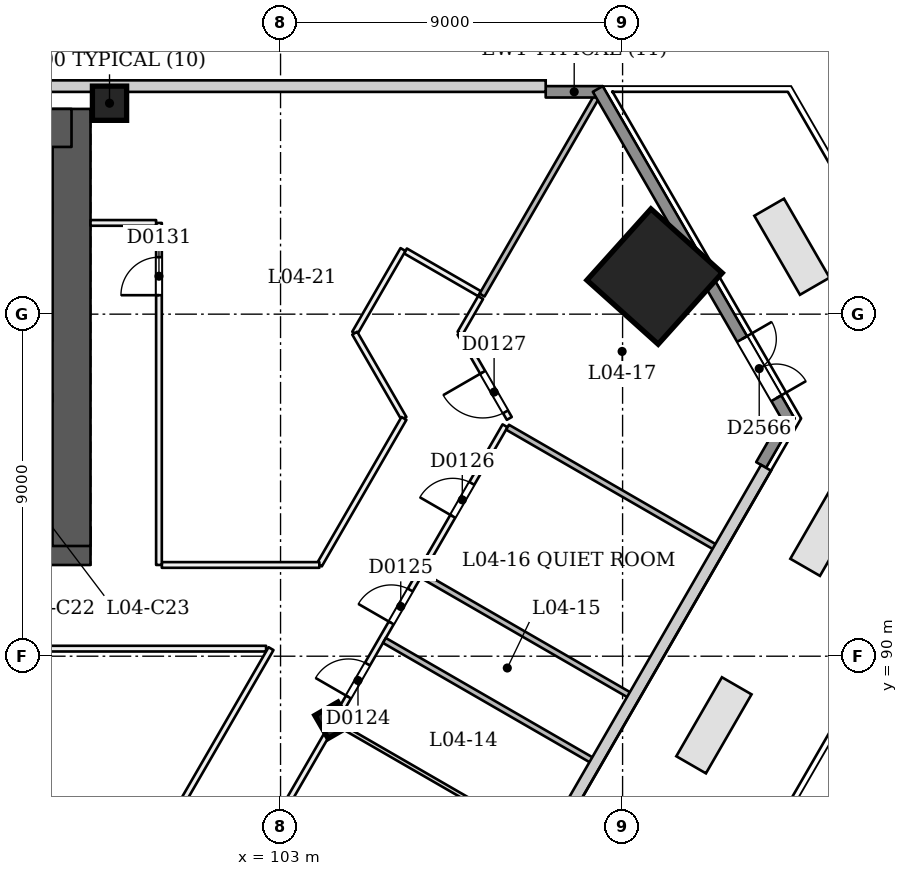
"""IFC4 building model, lengths in metres.
Left out: names, types, materials, properties, quantities, classifications, styles, units other than length and angle.
Written with IfcOpenShell. Run it as: python <this file> out.ifc"""

import sys

from ifc_helpers import new_model, si_unit, direction, frame, frame_2d, origin, origin_2d, place, context, subcontext, project, spatial, rectangle, extrude, element, fill, save


model = new_model("IFC4")
c1 = context("Model", 3, precision=1e-05, world=origin(), true_north=direction((0.0, 1.0)))
c2 = subcontext(c1, "Body", "Model", "MODEL_VIEW")
j1 = project(units=[si_unit("LENGTHUNIT", "METRE"), si_unit("PLANEANGLEUNIT", "RADIAN")], contexts=[c1])
p1 = place(None, origin())
s1 = spatial("IfcSite", under=j1, at=p1, CompositionType="ELEMENT")
p2 = place(p1, origin())
s2 = spatial("IfcBuilding", under=s1, at=p2, CompositionType="ELEMENT")
p3 = place(p2, frame((0.0, 0.0, 22.5)))
s3 = spatial("IfcBuildingStorey", under=s2, at=p3, CompositionType="ELEMENT", Elevation=22.5)
p4 = place(p3, frame((72.5, 92.9, 0.0), z_axis=(0.0, 0.0, 1.0), x_axis=(1.0, 0.0, 0.0)))
e1 = element("IfcWall", 1, at=p4, inside=s3, PredefinedType="SHEAR", context=c2, shape_type="SweptSolid", body=[
    extrude(rectangle(XDim=25.5, YDim=1.0, at=frame_2d((12.75, 0.0))), origin(), (0.0, 0.0, 1.0), 4.5),
])
p5 = place(p4, frame((1.3, 0.0, 0.0)))
e2 = element("IfcOpeningElement", 2, at=p5, cuts=e1, PredefinedType="OPENING", context=c2, shape_type="SweptSolid", body=[
    extrude(rectangle(XDim=1.2, YDim=2.1, at=frame_2d((0.6, 1.05))), frame((0.0, 0.51, 0.0), z_axis=(0.0, -1.0, 0.0), x_axis=(1.0, 0.0, 0.0)), (0.0, 0.0, 1.0), 1.021),
])
p6 = place(p4, frame((3.5, 0.0, 0.0)))
e3 = element("IfcOpeningElement", 3, at=p6, cuts=e1, PredefinedType="OPENING", context=c2, shape_type="SweptSolid", body=[
    extrude(rectangle(XDim=1.2, YDim=2.1, at=frame_2d((0.6, 1.05))), frame((0.0, 0.51, 0.0), z_axis=(0.0, -1.0, 0.0), x_axis=(1.0, 0.0, 0.0)), (0.0, 0.0, 1.0), 1.021),
])
p7 = place(p4, frame((13.5, 0.0, 0.0)))
e4 = element("IfcOpeningElement", 4, at=p7, cuts=e1, PredefinedType="OPENING", context=c2, shape_type="SweptSolid", body=[
    extrude(rectangle(XDim=1.2, YDim=2.1, at=frame_2d((0.6, 1.05))), frame((0.0, 0.51, 0.0), z_axis=(0.0, -1.0, 0.0), x_axis=(1.0, 0.0, 0.0)), (0.0, 0.0, 1.0), 1.021),
])
p8 = place(p4, frame((15.562, 0.0, 0.0)))
e5 = element("IfcOpeningElement", 5, at=p8, cuts=e1, PredefinedType="OPENING", context=c2, shape_type="SweptSolid", body=[
    extrude(rectangle(XDim=1.0, YDim=2.1, at=frame_2d((0.5, 1.05))), frame((0.0, 0.51, 0.0), z_axis=(0.0, -1.0, 0.0), x_axis=(1.0, 0.0, 0.0)), (0.0, 0.0, 1.0), 1.021),
])
p9 = place(p4, frame((17.8, 0.0, 0.0)))
e6 = element("IfcOpeningElement", 6, at=p9, cuts=e1, PredefinedType="OPENING", context=c2, shape_type="SweptSolid", body=[
    extrude(rectangle(XDim=1.0, YDim=2.1, at=frame_2d((0.5, 1.05))), frame((0.0, 0.51, 0.0), z_axis=(0.0, -1.0, 0.0), x_axis=(1.0, 0.0, 0.0)), (0.0, 0.0, 1.0), 1.021),
])
p10 = place(p4, frame((20.35, 0.0, 0.0)))
e7 = element("IfcOpeningElement", 7, at=p10, cuts=e1, PredefinedType="OPENING", context=c2, shape_type="SweptSolid", body=[
    extrude(rectangle(XDim=1.0, YDim=2.1, at=frame_2d((0.5, 1.05))), frame((0.0, 0.51, 0.0), z_axis=(0.0, -1.0, 0.0), x_axis=(1.0, 0.0, 0.0)), (0.0, 0.0, 1.0), 1.021),
])
p11 = place(p4, frame((22.837, 0.0, 0.0)))
e8 = element("IfcOpeningElement", 8, at=p11, cuts=e1, PredefinedType="OPENING", context=c2, shape_type="SweptSolid", body=[
    extrude(rectangle(XDim=1.0, YDim=2.1, at=frame_2d((0.5, 1.05))), frame((0.0, 0.51, 0.0), z_axis=(0.0, -1.0, 0.0), x_axis=(1.0, 0.0, 0.0)), (0.0, 0.0, 1.0), 1.021),
])
p12 = place(p3, frame((97.5, 92.9, 0.0), z_axis=(0.0, 0.0, 1.0), x_axis=(0.0, 1.0, 0.0)))
e9 = element("IfcWall", 9, at=p12, inside=s3, PredefinedType="SHEAR", context=c2, shape_type="SweptSolid", body=[
    extrude(rectangle(XDim=11.5, YDim=1.0, at=frame_2d((5.75, 0.0))), origin(), (0.0, 0.0, 1.0), 4.5),
])
p13 = place(p3, frame((97.5, 103.9, 0.0), z_axis=(0.0, 0.0, 1.0), x_axis=(-1.0, 0.0, 0.0)))
e10 = element("IfcWall", 10, at=p13, inside=s3, PredefinedType="SHEAR", context=c2, shape_type="SweptSolid", body=[
    extrude(rectangle(XDim=25.5, YDim=1.0, at=frame_2d((12.75, 0.0))), origin(), (0.0, 0.0, 1.0), 4.5),
])
p14 = place(p3, frame((104.408, 88.267, -0.021), z_axis=(-0.022167823514, 0.038427840761, 0.999015459668), x_axis=(-0.500557796662, -0.865418894264, 0.022181741384)))
e11 = element("IfcColumn", 11, at=p14, inside=s3, PredefinedType="COLUMN", context=c2, shape_type="SweptSolid", body=[
    extrude(rectangle(XDim=0.7, YDim=0.7, at=origin_2d()), origin(), (0.0, 0.0, 1.0), 4.504),
])
p15 = place(p3, frame((112.875, 99.978, 0.0), z_axis=(-0.028361945142, 0.009218987905, 0.999555206244), x_axis=(0.500391934376, -0.865514823496, 0.022181125308)))
e12 = element("IfcColumn", 12, at=p15, inside=s3, PredefinedType="COLUMN", context=c2, shape_type="SweptSolid", body=[
    extrude(rectangle(XDim=2.52, YDim=2.52, at=origin_2d()), origin(), (0.0, 0.0, 1.0), 4.502),
])
p16 = place(p3, frame((98.5, 104.55, 0.0), z_axis=(0.0, 0.0, 1.0), x_axis=(1.0, 0.0, 0.0)))
e13 = element("IfcColumn", 13, at=p16, inside=s3, PredefinedType="COLUMN", context=c2, shape_type="SweptSolid", body=[
    extrude(rectangle(XDim=0.9, YDim=0.9, at=origin_2d()), origin(), (0.0, 0.0, 1.0), 4.5),
])
p17 = place(p3, frame((86.407, 57.091, 0.0), z_axis=(0.0, 0.0, 1.0), x_axis=(0.49999953585, 0.866025671762, 0.0)))
e14 = element("IfcWall", 14, at=p17, inside=s3, PredefinedType="PARTITIONING", context=c2, shape_type="SweptSolid", body=[
    extrude(rectangle(XDim=45.0, YDim=0.15, at=frame_2d((22.5, 0.0))), origin(), (0.0, 0.0, 1.0), 3.6),
])
p18 = place(p17, frame((6.15, 0.0, 0.0)))
e15 = element("IfcOpeningElement", 15, at=p18, cuts=e14, PredefinedType="OPENING", context=c2, shape_type="SweptSolid", body=[
    extrude(rectangle(XDim=1.2, YDim=2.1, at=frame_2d((0.6, 1.05))), frame((0.0, 0.085, 0.0), z_axis=(0.0, -1.0, 0.0), x_axis=(1.0, 0.0, 0.0)), (0.0, 0.0, 1.0), 0.171),
])
p19 = place(p17, frame((16.3, 0.0, 0.0)))
e16 = element("IfcOpeningElement", 16, at=p19, cuts=e14, PredefinedType="OPENING", context=c2, shape_type="SweptSolid", body=[
    extrude(rectangle(XDim=1.2, YDim=2.1, at=frame_2d((0.6, 1.05))), frame((0.0, 0.085, 0.0), z_axis=(0.0, -1.0, 0.0), x_axis=(1.0, 0.0, 0.0)), (0.0, 0.0, 1.0), 0.171),
])
p20 = place(p17, frame((24.25, 0.0, 0.0)))
e17 = element("IfcOpeningElement", 17, at=p20, cuts=e14, PredefinedType="OPENING", context=c2, shape_type="SweptSolid", body=[
    extrude(rectangle(XDim=1.0, YDim=2.1, at=frame_2d((0.5, 1.05))), frame((0.0, 0.085, 0.0), z_axis=(0.0, -1.0, 0.0), x_axis=(1.0, 0.0, 0.0)), (0.0, 0.0, 1.0), 0.171),
])
p21 = place(p17, frame((30.9, 0.0, 0.0)))
e18 = element("IfcOpeningElement", 18, at=p21, cuts=e14, PredefinedType="OPENING", context=c2, shape_type="SweptSolid", body=[
    extrude(rectangle(XDim=1.2, YDim=2.1, at=frame_2d((0.6, 1.05))), frame((0.0, 0.085, 0.0), z_axis=(0.0, -1.0, 0.0), x_axis=(1.0, 0.0, 0.0)), (0.0, 0.0, 1.0), 0.171),
])
p22 = place(p17, frame((36.761, 0.0, 0.0)))
e19 = element("IfcOpeningElement", 19, at=p22, cuts=e14, PredefinedType="OPENING", context=c2, shape_type="SweptSolid", body=[
    extrude(rectangle(XDim=1.0, YDim=2.1, at=frame_2d((0.5, 1.05))), frame((0.0, 0.085, 0.0), z_axis=(0.0, -1.0, 0.0), x_axis=(1.0, 0.0, 0.0)), (0.0, 0.0, 1.0), 0.171),
])
p23 = place(p17, frame((39.011, 0.0, 0.0)))
e20 = element("IfcOpeningElement", 20, at=p23, cuts=e14, PredefinedType="OPENING", context=c2, shape_type="SweptSolid", body=[
    extrude(rectangle(XDim=1.0, YDim=2.1, at=frame_2d((0.5, 1.05))), frame((0.0, 0.085, 0.0), z_axis=(0.0, -1.0, 0.0), x_axis=(1.0, 0.0, 0.0)), (0.0, 0.0, 1.0), 0.171),
])
p24 = place(p17, frame((42.25, 0.0, 0.0)))
e21 = element("IfcOpeningElement", 21, at=p24, cuts=e14, PredefinedType="OPENING", context=c2, shape_type="SweptSolid", body=[
    extrude(rectangle(XDim=1.0, YDim=2.1, at=frame_2d((0.5, 1.05))), frame((0.0, 0.085, 0.0), z_axis=(0.0, -1.0, 0.0), x_axis=(1.0, 0.0, 0.0)), (0.0, 0.0, 1.0), 0.171),
])
p25 = place(p3, frame((109.019, 96.256, 0.0), z_axis=(0.0, 0.0, 1.0), x_axis=(-0.499939993713, 0.866060045659, 0.0)))
e22 = element("IfcWall", 22, at=p25, inside=s3, PredefinedType="PARTITIONING", context=c2, shape_type="SweptSolid", body=[
    extrude(rectangle(XDim=2.591, YDim=0.15, at=frame_2d((1.295, 0.0))), origin(), (0.0, 0.0, 1.0), 4.0),
])
p26 = place(p25, frame((0.2, 0.0, 0.0)))
e23 = element("IfcOpeningElement", 23, at=p26, cuts=e22, PredefinedType="OPENING", context=c2, shape_type="SweptSolid", body=[
    extrude(rectangle(XDim=1.2, YDim=2.1, at=frame_2d((0.6, 1.05))), frame((0.0, 0.085, 0.0), z_axis=(0.0, -1.0, 0.0), x_axis=(1.0, 0.0, 0.0)), (0.0, 0.0, 1.0), 0.171),
])
p27 = place(p3, frame((107.724, 98.5, 0.0), z_axis=(0.0, 0.0, 1.0), x_axis=(0.500002782129, 0.866023797515, 0.0)))
e24 = element("IfcWall", 24, at=p27, inside=s3, PredefinedType="PARTITIONING", context=c2, shape_type="SweptSolid", body=[
    extrude(rectangle(XDim=1.081, YDim=0.15, at=frame_2d((0.54, 0.0))), origin(), (0.0, 0.0, 1.0), 4.0),
])
p28 = place(p3, frame((91.601, 90.199, 0.0), z_axis=(0.0, 0.0, 1.0), x_axis=(1.0, 0.0, 0.0)))
e25 = element("IfcWall", 25, at=p28, inside=s3, PredefinedType="PARTITIONING", context=c2, shape_type="SweptSolid", body=[
    extrude(rectangle(XDim=11.019, YDim=0.15, at=frame_2d((5.509, 0.0))), origin(), (0.0, 0.0, 1.0), 4.0),
])
p29 = place(p3, frame((102.75, 90.199, 0.0), z_axis=(0.0, 0.0, 1.0), x_axis=(-0.500001686779, -0.86602442992, 0.0)))
e26 = element("IfcWall", 26, at=p29, inside=s3, PredefinedType="PARTITIONING", context=c2, shape_type="SweptSolid", body=[
    extrude(rectangle(XDim=35.37, YDim=0.15, at=frame_2d((17.685, 0.0))), origin(), (0.0, 0.0, 1.0), 4.0),
])
p30 = place(p29, frame((10.315, 0.0, 0.0)))
e27 = element("IfcOpeningElement", 27, at=p30, cuts=e26, PredefinedType="OPENING", context=c2, shape_type="SweptSolid", body=[
    extrude(rectangle(XDim=1.0, YDim=2.1, at=frame_2d((0.5, 1.05))), frame((0.0, 0.085, 0.0), z_axis=(0.0, -1.0, 0.0), x_axis=(1.0, 0.0, 0.0)), (0.0, 0.0, 1.0), 0.171),
])
p31 = place(p29, frame((21.571, 0.0, 0.0)))
e28 = element("IfcOpeningElement", 28, at=p31, cuts=e26, PredefinedType="OPENING", context=c2, shape_type="SweptSolid", body=[
    extrude(rectangle(XDim=1.0, YDim=2.1, at=frame_2d((0.5, 1.05))), frame((0.0, 0.085, 0.0), z_axis=(0.0, -1.0, 0.0), x_axis=(1.0, 0.0, 0.0)), (0.0, 0.0, 1.0), 0.171),
])
p32 = place(p29, frame((28.397, 0.0, 0.0)))
e29 = element("IfcOpeningElement", 29, at=p32, cuts=e26, PredefinedType="OPENING", context=c2, shape_type="SweptSolid", body=[
    extrude(rectangle(XDim=1.0, YDim=2.1, at=frame_2d((0.5, 1.05))), frame((0.0, 0.085, 0.0), z_axis=(0.0, -1.0, 0.0), x_axis=(1.0, 0.0, 0.0)), (0.0, 0.0, 1.0), 0.171),
])
p33 = place(p3, frame((108.237, 99.538, 0.0), z_axis=(0.0, 0.0, 1.0), x_axis=(-0.866200031611, 0.499697413678, 0.0)))
e30 = element("IfcWall", 30, at=p33, inside=s3, PredefinedType="PARTITIONING", context=c2, shape_type="SweptSolid", body=[
    extrude(rectangle(XDim=2.251, YDim=0.15, at=frame_2d((1.125, 0.0))), origin(), (0.0, 0.0, 1.0), 4.0),
])
p34 = place(p3, frame((106.222, 100.7, 0.0), z_axis=(0.0, 0.0, 1.0), x_axis=(-0.500024647231, -0.866011173231, 0.0)))
e31 = element("IfcWall", 31, at=p34, inside=s3, PredefinedType="PARTITIONING", context=c2, shape_type="SweptSolid", body=[
    extrude(rectangle(XDim=2.541, YDim=0.15, at=frame_2d((1.271, 0.0))), origin(), (0.0, 0.0, 1.0), 4.0),
])
p35 = place(p3, frame((104.952, 98.5, 0.0), z_axis=(0.0, 0.0, 1.0), x_axis=(0.500010673919, -0.866019241107, 0.0)))
e32 = element("IfcWall", 32, at=p35, inside=s3, PredefinedType="PARTITIONING", context=c2, shape_type="SweptSolid", body=[
    extrude(rectangle(XDim=2.591, YDim=0.15, at=frame_2d((1.295, 0.0))), origin(), (0.0, 0.0, 1.0), 4.0),
])
p36 = place(p3, frame((106.247, 96.256, 0.0), z_axis=(0.0, 0.0, 1.0), x_axis=(-0.50001992892, -0.866013897511, 0.0)))
e33 = element("IfcWall", 33, at=p36, inside=s3, PredefinedType="PARTITIONING", context=c2, shape_type="SweptSolid", body=[
    extrude(rectangle(XDim=4.452, YDim=0.15, at=frame_2d((2.226, 0.0))), origin(), (0.0, 0.0, 1.0), 4.0),
])
p37 = place(p3, frame((104.021, 92.401, 0.0), z_axis=(0.0, 0.0, 1.0), x_axis=(-1.0, 0.0, 0.0)))
e34 = element("IfcWall", 34, at=p37, inside=s3, PredefinedType="PARTITIONING", context=c2, shape_type="SweptSolid", body=[
    extrude(rectangle(XDim=4.145, YDim=0.15, at=frame_2d((2.073, 0.0))), origin(), (0.0, 0.0, 1.0), 4.0),
])
p38 = place(p3, frame((99.801, 92.401, 0.0), z_axis=(0.0, 0.0, 1.0), x_axis=(0.0, 1.0, 0.0)))
e35 = element("IfcWall", 35, at=p38, inside=s3, PredefinedType="PARTITIONING", context=c2, shape_type="SweptSolid", body=[
    extrude(rectangle(XDim=8.999, YDim=0.15, at=frame_2d((4.5, 0.0))), origin(), (0.0, 0.0, 1.0), 4.0),
])
p39 = place(p38, frame((7.098, 0.0, 0.0)))
e36 = element("IfcOpeningElement", 36, at=p39, cuts=e35, PredefinedType="OPENING", context=c2, shape_type="SweptSolid", body=[
    extrude(rectangle(XDim=1.0, YDim=2.1, at=frame_2d((0.5, 1.05))), frame((0.0, 0.085, 0.0), z_axis=(0.0, -1.0, 0.0), x_axis=(1.0, 0.0, 0.0)), (0.0, 0.0, 1.0), 0.171),
])
p40 = place(p3, frame((99.726, 101.4, 0.0), z_axis=(0.0, 0.0, 1.0), x_axis=(-0.999999909973, 0.000424328109, 0.0)))
e37 = element("IfcWall", 37, at=p40, inside=s3, PredefinedType="PARTITIONING", context=c2, shape_type="SweptSolid", body=[
    extrude(rectangle(XDim=1.726, YDim=0.15, at=frame_2d((0.863, 0.0))), origin(), (0.0, 0.0, 1.0), 4.0),
])
p41 = place(p3, frame((109.95, 85.068, 0.0), z_axis=(0.0, 0.0, 1.0), x_axis=(-0.866015887322, 0.500016482634, 0.0)))
e38 = element("IfcWall", 38, at=p41, inside=s3, PredefinedType="PARTITIONING", context=c2, shape_type="SweptSolid", body=[
    extrude(rectangle(XDim=6.325, YDim=0.1, at=frame_2d((3.163, 0.0))), origin(), (0.0, 0.0, 1.0), 3.5),
])
p42 = place(p3, frame((111.225, 87.244, 0.0), z_axis=(0.0, 0.0, 1.0), x_axis=(-0.866031065609, 0.499990193304, 0.0)))
e39 = element("IfcWall", 39, at=p42, inside=s3, PredefinedType="PARTITIONING", context=c2, shape_type="SweptSolid", body=[
    extrude(rectangle(XDim=6.341, YDim=0.15, at=frame_2d((3.17, 0.0))), origin(), (0.0, 0.0, 1.0), 3.5),
])
for number, where, z_axis, x_axis in (
    (40, (112.2, 88.965, 0.0), (0.0, 0.0, 1.0), (-0.866, 0.5, 0.0)),
    (41, (114.45, 92.862, 0.0), (0.0, 0.0, 1.0), (-0.866, 0.5, 0.0)),
):
    element("IfcWall", number, at=place(p3, frame(where, z_axis=z_axis, x_axis=x_axis)), inside=s3, PredefinedType="PARTITIONING", context=c2, shape_type="SweptSolid", body=[
        extrude(rectangle(XDim=6.325, YDim=0.15, at=frame_2d((3.163, 0.0))), origin(), (0.0, 0.0, 1.0), 3.5),
    ])
p43 = place(p3, frame((111.419, 104.9, 0.0), z_axis=(0.0, 0.0, 1.0), x_axis=(-0.500013984911, -0.866017329442, 0.0)))
e42 = element("IfcWall", 42, at=p43, inside=s3, PredefinedType="PARTITIONING", context=c2, shape_type="SweptSolid", body=[
    extrude(rectangle(XDim=6.234, YDim=0.15, at=frame_2d((3.117, 0.0))), origin(), (0.0, 0.0, 1.0), 3.5),
])
for number, where, z_axis, x_axis in (
    (43, (109.977, 104.85, 0.0), (0.0, 0.0, 1.0), (1.0, 0.0, 0.0)),
    (44, (116.395, 96.332, 0.0), (0.0, 0.0, 1.0), (-0.5, -0.866, 0.0)),
):
    element("IfcWall", number, at=place(p3, frame(where, z_axis=z_axis, x_axis=x_axis)), inside=s3, PredefinedType="SOLIDWALL", context=c2, shape_type="SweptSolid", body=[
        extrude(rectangle(XDim=1.5, YDim=0.3, at=frame_2d((0.75, 0.0))), origin(), (0.0, 0.0, 1.0), 3.5),
    ])
p44 = place(p3, frame((111.347, 104.925, 0.0), z_axis=(0.0, 0.0, 1.0), x_axis=(0.499995964007, -0.866027733953, 0.0)))
e45 = element("IfcWall", 45, at=p44, inside=s3, PredefinedType="SOLIDWALL", context=c2, shape_type="SweptSolid", body=[
    extrude(rectangle(XDim=10.096, YDim=0.3, at=frame_2d((5.048, 0.0))), origin(), (0.0, 0.0, 1.0), 3.5),
])
p45 = place(p44, frame((7.596, 0.0, 0.0)))
e46 = element("IfcOpeningElement", 46, at=p45, cuts=e45, PredefinedType="OPENING", context=c2, shape_type="SweptSolid", body=[
    extrude(rectangle(XDim=1.8, YDim=2.4, at=frame_2d((0.9, 1.2))), frame((0.0, 0.161, 0.0), z_axis=(0.0, -1.0, 0.0), x_axis=(1.0, 0.0, 0.0)), (0.0, 0.0, 1.0), 0.321),
])
p46 = place(p22, origin())
e47 = element("IfcDoor", 47, at=p46, inside=s3, OperationType="SINGLE_SWING_LEFT", PredefinedType="NOTDEFINED", context=c2, shape_type="SweptSolid", body=[
    extrude(rectangle(XDim=1.0, YDim=2.1, at=frame_2d((0.5, 1.05))), frame((0.0, 0.025, 0.0), z_axis=(0.0, -1.0, 0.0), x_axis=(1.0, 0.0, 0.0)), (0.0, 0.0, 1.0), 0.05),
])
fill(e19, e47)
p47 = place(p23, origin())
e48 = element("IfcDoor", 48, at=p47, inside=s3, OperationType="SINGLE_SWING_LEFT", PredefinedType="NOTDEFINED", context=c2, shape_type="SweptSolid", body=[
    extrude(rectangle(XDim=1.0, YDim=2.1, at=frame_2d((0.5, 1.05))), frame((0.0, 0.025, 0.0), z_axis=(0.0, -1.0, 0.0), x_axis=(1.0, 0.0, 0.0)), (0.0, 0.0, 1.0), 0.05),
])
fill(e20, e48)
p48 = place(p24, origin())
e49 = element("IfcDoor", 49, at=p48, inside=s3, OperationType="SINGLE_SWING_LEFT", PredefinedType="NOTDEFINED", context=c2, shape_type="SweptSolid", body=[
    extrude(rectangle(XDim=1.0, YDim=2.1, at=frame_2d((0.5, 1.05))), frame((0.0, 0.025, 0.0), z_axis=(0.0, -1.0, 0.0), x_axis=(1.0, 0.0, 0.0)), (0.0, 0.0, 1.0), 0.05),
])
fill(e21, e49)
p49 = place(p26, origin())
e50 = element("IfcDoor", 50, at=p49, inside=s3, OperationType="SINGLE_SWING_RIGHT", PredefinedType="NOTDEFINED", context=c2, shape_type="SweptSolid", body=[
    extrude(rectangle(XDim=1.2, YDim=2.1, at=frame_2d((0.6, 1.05))), frame((0.0, 0.025, 0.0), z_axis=(0.0, -1.0, 0.0), x_axis=(1.0, 0.0, 0.0)), (0.0, 0.0, 1.0), 0.05),
])
fill(e23, e50)
p50 = place(p39, origin())
e51 = element("IfcDoor", 51, at=p50, inside=s3, OperationType="SINGLE_SWING_LEFT", PredefinedType="NOTDEFINED", context=c2, shape_type="SweptSolid", body=[
    extrude(rectangle(XDim=1.0, YDim=2.1, at=frame_2d((0.5, 1.05))), frame((0.0, 0.025, 0.0), z_axis=(0.0, -1.0, 0.0), x_axis=(1.0, 0.0, 0.0)), (0.0, 0.0, 1.0), 0.05),
])
fill(e36, e51)
p51 = place(p45, origin())
e52 = element("IfcDoor", 52, at=p51, inside=s3, OperationType="DOUBLE_DOOR_SINGLE_SWING", PredefinedType="NOTDEFINED", context=c2, shape_type="SweptSolid", body=[
    extrude(rectangle(XDim=1.8, YDim=2.4, at=frame_2d((0.9, 1.2))), frame((0.0, 0.025, 0.0), z_axis=(0.0, -1.0, 0.0), x_axis=(1.0, 0.0, 0.0)), (0.0, 0.0, 1.0), 0.05),
])
fill(e46, e52)
save(model, sys.argv[1])
